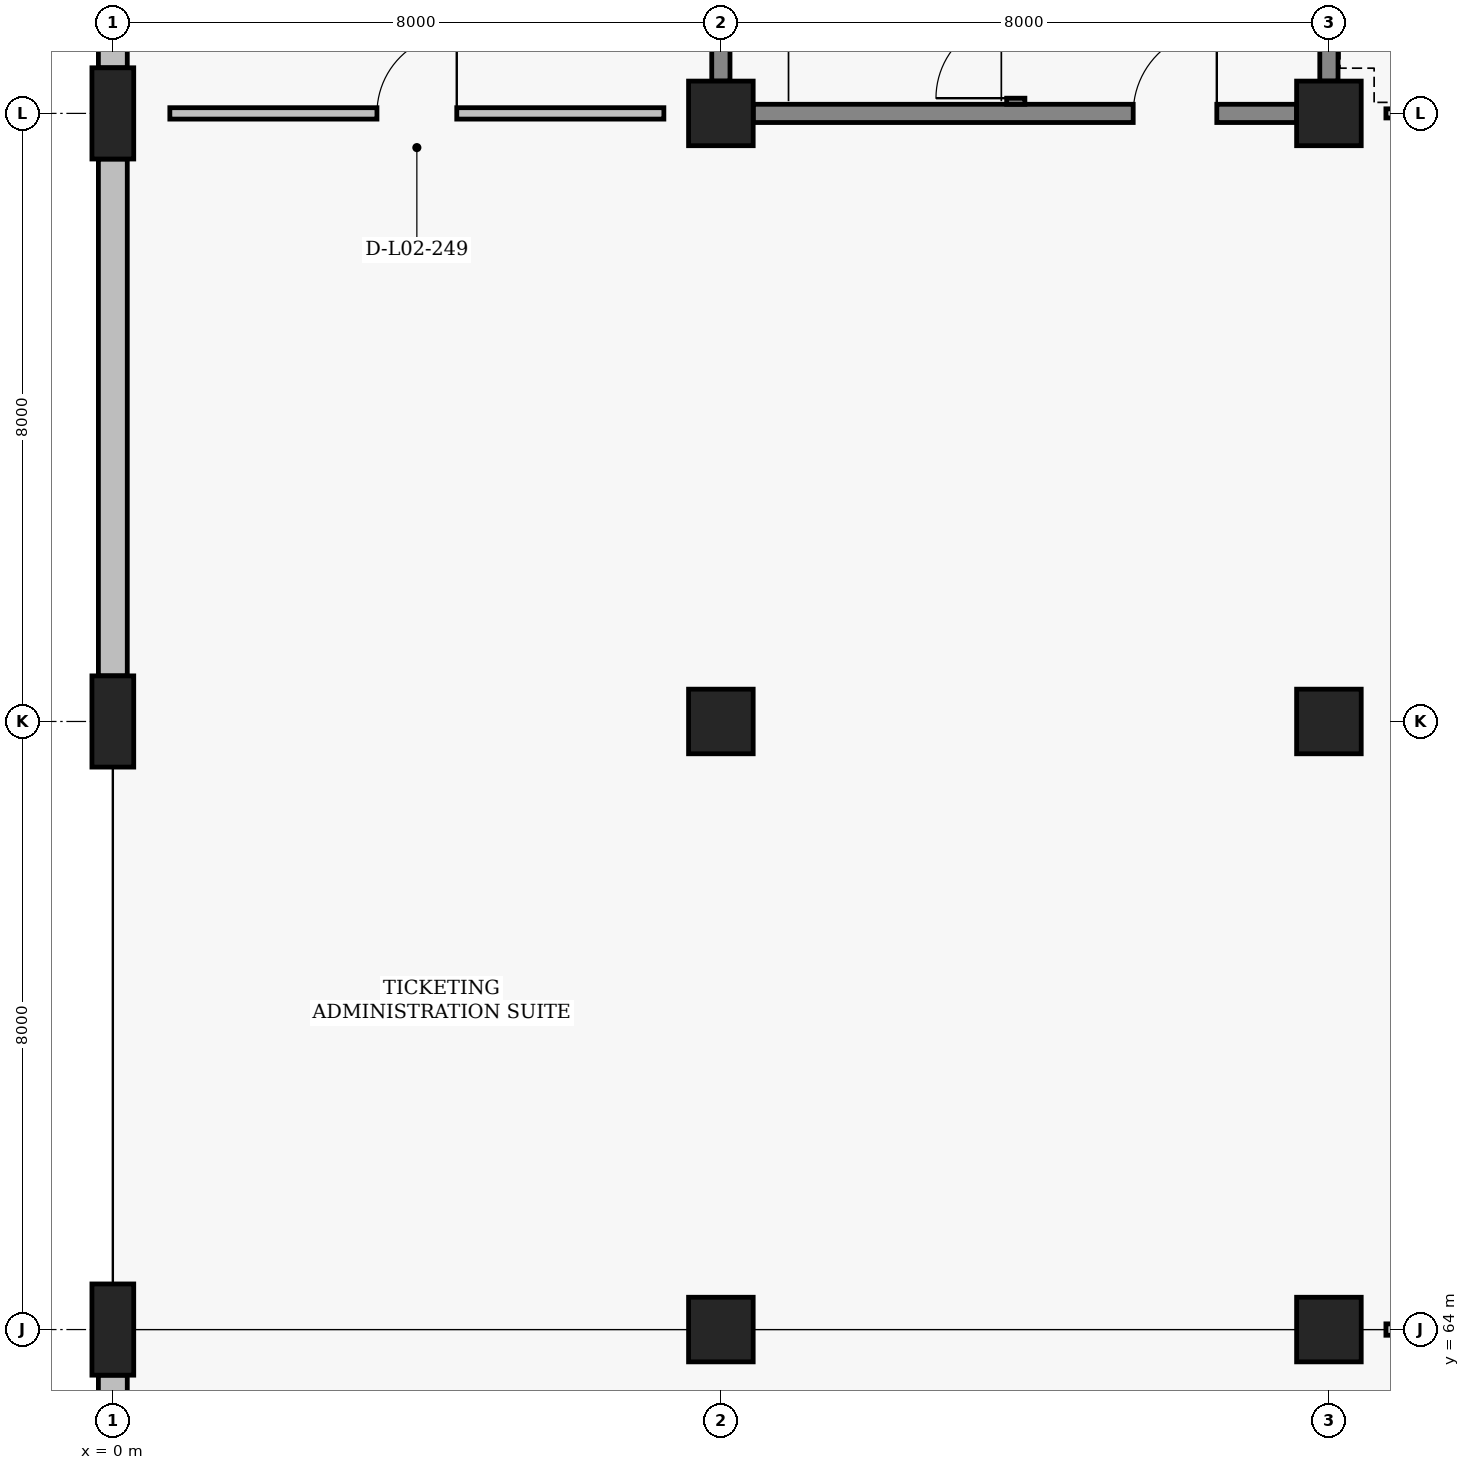
"""IFC4 building model, lengths in metres.
Left out: names, types, materials, properties, quantities, classifications, styles, units other than length and angle.
Written with IfcOpenShell. Run it as: python <this file> out.ifc"""

import sys

from ifc_helpers import new_model, si_unit, direction, frame, frame_2d, origin, origin_2d, place, context, subcontext, project, spatial, rectangle, circle, extrude, element, fill, save


model = new_model("IFC4")
c1 = context("Model", 3, precision=1e-05, world=origin(), true_north=direction((0.0, 1.0)))
c2 = subcontext(c1, "Body", "Model", "MODEL_VIEW")
j1 = project(units=[si_unit("LENGTHUNIT", "METRE"), si_unit("PLANEANGLEUNIT", "RADIAN")], contexts=[c1])
p1 = place(None, origin())
s1 = spatial("IfcSite", under=j1, at=p1, CompositionType="ELEMENT")
p2 = place(p1, origin())
s2 = spatial("IfcBuilding", under=s1, at=p2, CompositionType="ELEMENT")
p3 = place(p2, frame((0.0, 0.0, 4.8)))
s3 = spatial("IfcBuildingStorey", under=s2, at=p3, CompositionType="ELEMENT", Elevation=4.8)
for number, where, z_axis, x_axis in (
    (1, (0.0, 64.0, 0.0), (0.0, 0.0, 1.0), (1.0, 0.0, 0.0)),
    (2, (0.0, 72.0, 0.0), (0.0, 0.0, 1.0), (1.0, 0.0, 0.0)),
    (3, (0.0, 80.0, 0.0), (0.0, 0.0, 1.0), (1.0, 0.0, 0.0)),
):
    element("IfcColumn", number, at=place(p3, frame(where, z_axis=z_axis, x_axis=x_axis)), inside=s3, PredefinedType="PILASTER", context=c2, shape_type="SweptSolid", body=[
        extrude(rectangle(XDim=0.55, YDim=1.2, at=origin_2d()), origin(), (0.0, 0.0, 1.0), 4.8),
    ])
for number, where, z_axis, x_axis in (
    (4, (8.0, 64.0, 0.0), (0.0, 0.0, 1.0), (1.0, 0.0, 0.0)),
    (5, (8.0, 72.0, 0.0), (0.0, 0.0, 1.0), (1.0, 0.0, 0.0)),
    (6, (8.0, 80.0, 0.0), (0.0, 0.0, 1.0), (1.0, 0.0, 0.0)),
    (7, (16.0, 64.0, 0.0), (0.0, 0.0, 1.0), (1.0, 0.0, 0.0)),
    (8, (16.0, 72.0, 0.0), (0.0, 0.0, 1.0), (1.0, 0.0, 0.0)),
    (9, (16.0, 80.0, 0.0), (0.0, 0.0, 1.0), (1.0, 0.0, 0.0)),
):
    element("IfcColumn", number, at=place(p3, frame(where, z_axis=z_axis, x_axis=x_axis)), inside=s3, PredefinedType="COLUMN", context=c2, shape_type="SweptSolid", body=[
        extrude(circle(Radius=0.425, at=origin_2d()), origin(), (0.0, 0.0, 1.0), 4.8),
    ])
for number, where, z_axis, x_axis in (
    (10, (0.0, 56.6, 0.0), (0.0, 0.0, 1.0), (0.0, 1.0, 0.0)),
    (11, (0.0, 72.6, 0.0), (0.0, 0.0, 1.0), (0.0, 1.0, 0.0)),
):
    element("IfcWall", number, at=place(p3, frame(where, z_axis=z_axis, x_axis=x_axis)), inside=s3, PredefinedType="SOLIDWALL", context=c2, shape_type="SweptSolid", body=[
        extrude(rectangle(XDim=6.8, YDim=0.38, at=frame_2d((3.4, 0.0))), origin(), (0.0, 0.0, 1.0), 3.95),
    ])
p4 = place(p3, frame((0.0, 80.6, 0.0), z_axis=(0.0, 0.0, 1.0), x_axis=(0.0, 1.0, 0.0)))
e12 = element("IfcWall", 12, at=p4, inside=s3, PredefinedType="SOLIDWALL", context=c2, shape_type="SweptSolid", body=[
    extrude(rectangle(XDim=6.8, YDim=0.38, at=frame_2d((3.4, 0.0))), origin(), (0.0, 0.0, 1.0), 3.95),
])
p5 = place(p4, frame((2.35, 0.0, 0.95)))
e13 = element("IfcOpeningElement", 13, at=p5, cuts=e12, PredefinedType="OPENING", context=c2, shape_type="SweptSolid", body=[
    extrude(rectangle(XDim=2.1, YDim=1.9, at=frame_2d((1.05, 0.95))), frame((0.0, 0.2, 0.0), z_axis=(0.0, -1.0, 0.0), x_axis=(1.0, 0.0, 0.0)), (0.0, 0.0, 1.0), 0.4),
])
p6 = place(p3, frame((8.425, 80.0, 0.0), z_axis=(0.0, 0.0, 1.0), x_axis=(1.0, 0.0, 0.0)))
e14 = element("IfcWall", 14, at=p6, inside=s3, PredefinedType="SHEAR", context=c2, shape_type="SweptSolid", body=[
    extrude(rectangle(XDim=7.15, YDim=0.24, at=frame_2d((3.575, 0.0))), origin(), (0.0, 0.0, 1.0), 3.61),
])
p7 = place(p6, frame((5.0, 0.0, 0.0)))
e15 = element("IfcOpeningElement", 15, at=p7, cuts=e14, PredefinedType="OPENING", context=c2, shape_type="SweptSolid", body=[
    extrude(rectangle(XDim=1.1, YDim=2.2, at=frame_2d((0.55, 1.1))), frame((0.0, 0.13, 0.0), z_axis=(0.0, -1.0, 0.0), x_axis=(1.0, 0.0, 0.0)), (0.0, 0.0, 1.0), 0.26),
])
p8 = place(p3, frame((8.0, 80.425, 0.0), z_axis=(0.0, 0.0, 1.0), x_axis=(0.0, 1.0, 0.0)))
e16 = element("IfcWall", 16, at=p8, inside=s3, PredefinedType="SHEAR", context=c2, shape_type="SweptSolid", body=[
    extrude(rectangle(XDim=7.15, YDim=0.24, at=frame_2d((3.575, 0.0))), origin(), (0.0, 0.0, 1.0), 3.91),
])
p9 = place(p3, frame((16.0, 80.425, 0.0), z_axis=(0.0, 0.0, 1.0), x_axis=(0.0, 1.0, 0.0)))
e17 = element("IfcWall", 17, at=p9, inside=s3, PredefinedType="SHEAR", context=c2, shape_type="SweptSolid", body=[
    extrude(rectangle(XDim=7.15, YDim=0.24, at=frame_2d((3.575, 0.0))), origin(), (0.0, 0.0, 1.0), 3.61),
])
p10 = place(p3, frame((11.88, 80.12, 0.0), z_axis=(0.0, 0.0, 1.0), x_axis=(0.0, 1.0, 0.0)))
e18 = element("IfcWall", 18, at=p10, inside=s3, PredefinedType="SHEAR", context=c2, shape_type="SweptSolid", body=[
    extrude(rectangle(XDim=7.76, YDim=0.24, at=frame_2d((3.88, 0.0))), origin(), (0.0, 0.0, 1.0), 4.01),
])
p11 = place(p10, frame((0.08, 0.0, 0.0)))
e19 = element("IfcOpeningElement", 19, at=p11, cuts=e18, PredefinedType="OPENING", context=c2, shape_type="SweptSolid", body=[
    extrude(rectangle(XDim=1.05, YDim=2.15, at=frame_2d((0.525, 1.075))), frame((0.0, 0.13, 0.0), z_axis=(0.0, -1.0, 0.0), x_axis=(1.0, 0.0, 0.0)), (0.0, 0.0, 1.0), 0.26),
])
p12 = place(p3, frame((0.75, 80.0, 0.0), z_axis=(0.0, 0.0, 1.0), x_axis=(1.0, 0.0, 0.0)))
e20 = element("IfcWall", 20, at=p12, inside=s3, PredefinedType="PARTITIONING", context=c2, shape_type="SweptSolid", body=[
    extrude(rectangle(XDim=6.5, YDim=0.15, at=frame_2d((3.25, 0.0))), origin(), (0.0, 0.0, 1.0), 3.97),
])
p13 = place(p12, frame((2.725, 0.0, 0.0)))
e21 = element("IfcOpeningElement", 21, at=p13, cuts=e20, PredefinedType="OPENING", context=c2, shape_type="SweptSolid", body=[
    extrude(rectangle(XDim=1.05, YDim=2.15, at=frame_2d((0.525, 1.075))), frame((0.0, 0.085, 0.0), z_axis=(0.0, -1.0, 0.0), x_axis=(1.0, 0.0, 0.0)), (0.0, 0.0, 1.0), 0.17),
])
p14 = place(p3, frame((16.75, 64.0, 0.0), z_axis=(0.0, 0.0, 1.0), x_axis=(1.0, 0.0, 0.0)))
e22 = element("IfcWall", 22, at=p14, inside=s3, PredefinedType="PARTITIONING", context=c2, shape_type="SweptSolid", body=[
    extrude(rectangle(XDim=6.5, YDim=0.15, at=frame_2d((3.25, 0.0))), origin(), (0.0, 0.0, 1.0), 3.91),
])
p15 = place(p14, frame((2.725, 0.0, 0.0)))
e23 = element("IfcOpeningElement", 23, at=p15, cuts=e22, PredefinedType="OPENING", context=c2, shape_type="SweptSolid", body=[
    extrude(rectangle(XDim=1.05, YDim=2.15, at=frame_2d((0.525, 1.075))), frame((0.0, 0.085, 0.0), z_axis=(0.0, -1.0, 0.0), x_axis=(1.0, 0.0, 0.0)), (0.0, 0.0, 1.0), 0.17),
])
p16 = place(p3, frame((16.75, 80.0, 0.0), z_axis=(0.0, 0.0, 1.0), x_axis=(1.0, 0.0, 0.0)))
e24 = element("IfcWall", 24, at=p16, inside=s3, PredefinedType="PARTITIONING", context=c2, shape_type="SweptSolid", body=[
    extrude(rectangle(XDim=6.5, YDim=0.12, at=frame_2d((3.25, 0.0))), origin(), (0.0, 0.0, 1.0), 3.61),
])
p17 = place(p16, frame((2.75, 0.0, 0.0)))
e25 = element("IfcOpeningElement", 25, at=p17, cuts=e24, PredefinedType="OPENING", context=c2, shape_type="SweptSolid", body=[
    extrude(rectangle(XDim=1.0, YDim=2.1, at=frame_2d((0.5, 1.05))), frame((0.0, 0.07, 0.0), z_axis=(0.0, -1.0, 0.0), x_axis=(1.0, 0.0, 0.0)), (0.0, 0.0, 1.0), 0.14),
])
p18 = place(p7, origin())
e26 = element("IfcDoor", 26, at=p18, inside=s3, OperationType="SINGLE_SWING_RIGHT", PredefinedType="DOOR", context=c2, shape_type="SweptSolid", body=[
    extrude(rectangle(XDim=1.1, YDim=2.2, at=frame_2d((0.55, 1.1))), frame((0.0, 0.025, 0.0), z_axis=(0.0, -1.0, 0.0), x_axis=(1.0, 0.0, 0.0)), (0.0, 0.0, 1.0), 0.05),
])
fill(e15, e26)
p19 = place(p11, origin())
e27 = element("IfcDoor", 27, at=p19, inside=s3, OperationType="SINGLE_SWING_LEFT", PredefinedType="DOOR", context=c2, shape_type="SweptSolid", body=[
    extrude(rectangle(XDim=1.05, YDim=2.15, at=frame_2d((0.525, 1.075))), frame((0.0, 0.025, 0.0), z_axis=(0.0, -1.0, 0.0), x_axis=(1.0, 0.0, 0.0)), (0.0, 0.0, 1.0), 0.05),
])
fill(e19, e27)
p20 = place(p13, origin())
e28 = element("IfcDoor", 28, at=p20, inside=s3, OperationType="SINGLE_SWING_RIGHT", PredefinedType="DOOR", context=c2, shape_type="SweptSolid", body=[
    extrude(rectangle(XDim=1.05, YDim=2.15, at=frame_2d((0.525, 1.075))), frame((0.0, 0.025, 0.0), z_axis=(0.0, -1.0, 0.0), x_axis=(1.0, 0.0, 0.0)), (0.0, 0.0, 1.0), 0.05),
])
fill(e21, e28)
save(model, sys.argv[1])
